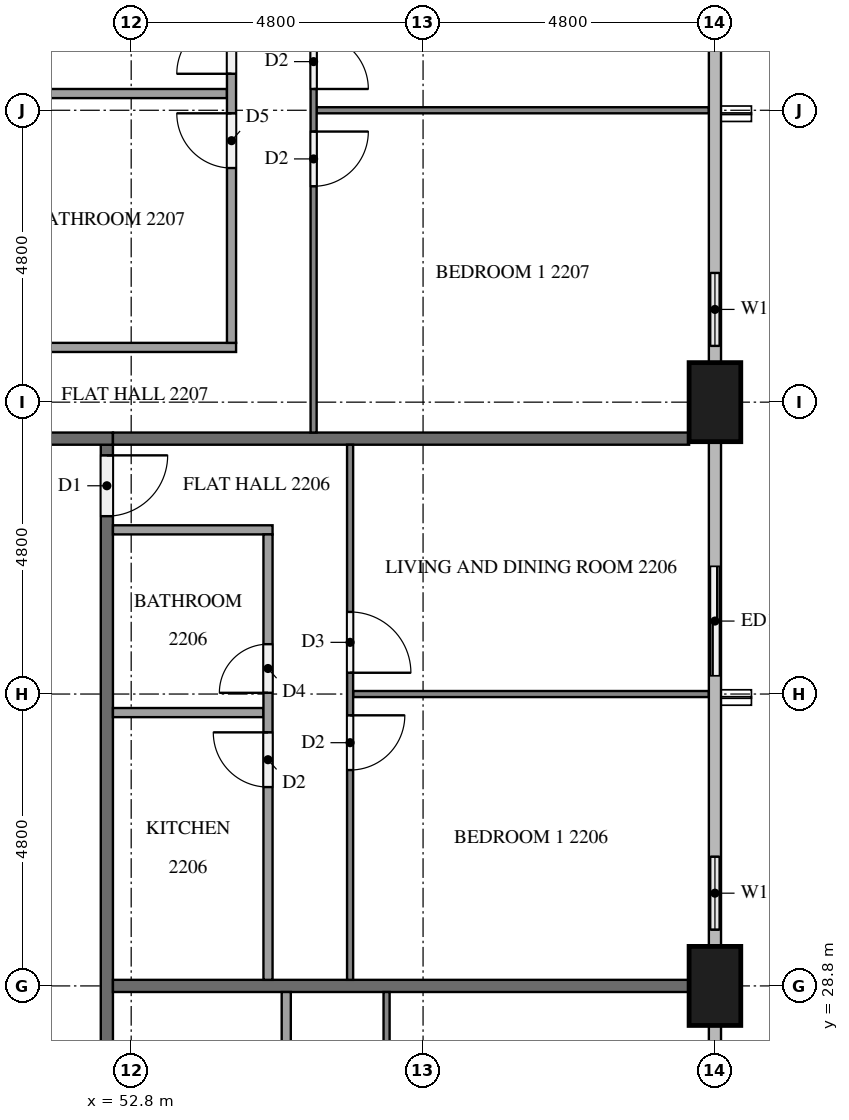
"""IFC4 building model, lengths in metres.
Left out: names, types, materials, properties, quantities, classifications, styles, units other than length and angle.
Written with IfcOpenShell. Run it as: python <this file> out.ifc"""

import sys

from ifc_helpers import new_model, si_unit, direction, frame, frame_2d, origin, origin_2d, place, context, subcontext, project, spatial, rectangle, extrude, element, fill, save


model = new_model("IFC4")
c1 = context("Model", 3, precision=1e-05, world=origin(), true_north=direction((0.0, 1.0)))
c2 = subcontext(c1, "Body", "Model", "MODEL_VIEW")
j1 = project(units=[si_unit("LENGTHUNIT", "METRE"), si_unit("PLANEANGLEUNIT", "RADIAN")], contexts=[c1])
p1 = place(None, origin())
s1 = spatial("IfcSite", under=j1, at=p1, CompositionType="ELEMENT")
p2 = place(p1, origin())
s2 = spatial("IfcBuilding", under=s1, at=p2, CompositionType="ELEMENT")
p3 = place(p2, frame((0.0, 0.0, 89.2)))
s3 = spatial("IfcBuildingStorey", under=s2, at=p3, CompositionType="ELEMENT", Elevation=89.2)
for number, where, z_axis, x_axis in (
    (1, (62.4, 28.8, 0.0), (0.0, 0.0, 1.0), (0.0, 1.0, 0.0)),
    (2, (62.4, 38.4, 0.0), (0.0, 0.0, 1.0), (0.0, 1.0, 0.0)),
):
    element("IfcColumn", number, at=place(p3, frame(where, z_axis=z_axis, x_axis=x_axis)), inside=s3, PredefinedType="COLUMN", context=c2, shape_type="SweptSolid", body=[
        extrude(rectangle(XDim=1.3, YDim=0.85, at=origin_2d()), origin(), (0.0, 0.0, 1.0), 3.2),
    ])
p4 = place(p3, frame((62.4, 29.45, 0.0), z_axis=(0.0, 0.0, 1.0), x_axis=(0.0, 1.0, 0.0)))
e3 = element("IfcWall", 3, at=p4, inside=s3, PredefinedType="SOLIDWALL", context=c2, shape_type="SweptSolid", body=[
    extrude(rectangle(XDim=1.75, YDim=0.15, at=frame_2d((0.875, 0.0))), origin(), (0.0, 0.0, 1.0), 3.2),
])
p5 = place(p4, frame((0.275, 0.0, 0.9)))
e4 = element("IfcOpeningElement", 4, at=p5, cuts=e3, PredefinedType="OPENING", context=c2, shape_type="SweptSolid", body=[
    extrude(rectangle(XDim=1.2, YDim=1.4, at=frame_2d((0.6, 0.7))), frame((0.0, 0.085, 0.0), z_axis=(0.0, -1.0, 0.0), x_axis=(1.0, 0.0, 0.0)), (0.0, 0.0, 1.0), 0.17),
])
p6 = place(p3, frame((62.4, 33.6, 0.0), z_axis=(0.0, 0.0, 1.0), x_axis=(0.0, 1.0, 0.0)))
e5 = element("IfcWall", 5, at=p6, inside=s3, PredefinedType="SOLIDWALL", context=c2, shape_type="SweptSolid", body=[
    extrude(rectangle(XDim=2.4, YDim=0.15, at=frame_2d((1.2, 0.0))), origin(), (0.0, 0.0, 1.0), 3.2),
])
p7 = place(p6, frame((0.3, 0.0, 0.0)))
e6 = element("IfcOpeningElement", 6, at=p7, cuts=e5, PredefinedType="OPENING", context=c2, shape_type="SweptSolid", body=[
    extrude(rectangle(XDim=1.8, YDim=2.4, at=frame_2d((0.9, 1.2))), frame((0.0, 0.085, 0.0), z_axis=(0.0, -1.0, 0.0), x_axis=(1.0, 0.0, 0.0)), (0.0, 0.0, 1.0), 0.17),
])
p8 = place(p3, frame((62.4, 39.05, 0.0), z_axis=(0.0, 0.0, 1.0), x_axis=(0.0, 1.0, 0.0)))
e7 = element("IfcWall", 7, at=p8, inside=s3, PredefinedType="SOLIDWALL", context=c2, shape_type="SweptSolid", body=[
    extrude(rectangle(XDim=1.75, YDim=0.15, at=frame_2d((0.875, 0.0))), origin(), (0.0, 0.0, 1.0), 3.2),
])
p9 = place(p8, frame((0.275, 0.0, 0.9)))
e8 = element("IfcOpeningElement", 8, at=p9, cuts=e7, PredefinedType="OPENING", context=c2, shape_type="SweptSolid", body=[
    extrude(rectangle(XDim=1.2, YDim=1.4, at=frame_2d((0.6, 0.7))), frame((0.0, 0.085, 0.0), z_axis=(0.0, -1.0, 0.0), x_axis=(1.0, 0.0, 0.0)), (0.0, 0.0, 1.0), 0.17),
])
p10 = place(p3, frame((52.4, 37.7, 0.0), z_axis=(0.0, 0.0, 1.0), x_axis=(0.0, -1.0, 0.0)))
e9 = element("IfcWall", 9, at=p10, inside=s3, PredefinedType="PARTITIONING", context=c2, shape_type="SweptSolid", body=[
    extrude(rectangle(XDim=22.6, YDim=0.2, at=frame_2d((11.3, 0.0))), origin(), (0.0, 0.0, 1.0), 3.2),
])
p11 = place(p10, frame((21.425, 0.0, 0.0)))
e10 = element("IfcOpeningElement", 10, at=p11, cuts=e9, PredefinedType="OPENING", context=c2, shape_type="SweptSolid", body=[
    extrude(rectangle(XDim=1.0, YDim=2.1, at=frame_2d((0.5, 1.05))), frame((0.0, 0.11, 0.0), z_axis=(0.0, -1.0, 0.0), x_axis=(1.0, 0.0, 0.0)), (0.0, 0.0, 1.0), 0.22),
])
p12 = place(p10, frame((0.175, 0.0, 0.0)))
e11 = element("IfcOpeningElement", 11, at=p12, cuts=e9, PredefinedType="OPENING", context=c2, shape_type="SweptSolid", body=[
    extrude(rectangle(XDim=1.0, YDim=2.1, at=frame_2d((0.5, 1.05))), frame((0.0, 0.11, 0.0), z_axis=(0.0, -1.0, 0.0), x_axis=(1.0, 0.0, 0.0)), (0.0, 0.0, 1.0), 0.22),
])
p13 = place(p3, frame((52.5, 37.8, 0.0), z_axis=(0.0, 0.0, 1.0), x_axis=(-1.0, 0.0, 0.0)))
e12 = element("IfcWall", 12, at=p13, inside=s3, PredefinedType="PARTITIONING", context=c2, shape_type="SweptSolid", body=[
    extrude(rectangle(XDim=2.2, YDim=0.2, at=frame_2d((1.1, 0.0))), origin(), (0.0, 0.0, 1.0), 3.2),
])
for number, where, z_axis, x_axis in (
    (13, (52.5, 28.8, 0.0), (0.0, 0.0, 1.0), (1.0, 0.0, 0.0)),
    (14, (52.5, 37.8, 0.0), (0.0, 0.0, 1.0), (1.0, 0.0, 0.0)),
):
    element("IfcWall", number, at=place(p3, frame(where, z_axis=z_axis, x_axis=x_axis)), inside=s3, PredefinedType="PARTITIONING", context=c2, shape_type="SweptSolid", body=[
        extrude(rectangle(XDim=9.475, YDim=0.2, at=frame_2d((4.738, 0.0))), origin(), (0.0, 0.0, 1.0), 3.2),
    ])
p14 = place(p3, frame((57.0, 28.7, 0.0), z_axis=(0.0, 0.0, 1.0), x_axis=(0.0, -1.0, 0.0)))
e15 = element("IfcWall", 15, at=p14, inside=s3, PredefinedType="PARTITIONING", context=c2, shape_type="SweptSolid", body=[
    extrude(rectangle(XDim=13.6, YDim=0.1, at=frame_2d((6.8, 0.0))), origin(), (0.0, 0.0, 1.0), 3.2),
])
p15 = place(p14, frame((12.4, 0.0, 0.0)))
e16 = element("IfcOpeningElement", 16, at=p15, cuts=e15, PredefinedType="OPENING", context=c2, shape_type="SweptSolid", body=[
    extrude(rectangle(XDim=0.9, YDim=2.1, at=frame_2d((0.45, 1.05))), frame((0.0, 0.06, 0.0), z_axis=(0.0, -1.0, 0.0), x_axis=(1.0, 0.0, 0.0)), (0.0, 0.0, 1.0), 0.12),
])
p16 = place(p14, frame((5.05, 0.0, 0.0)))
e17 = element("IfcOpeningElement", 17, at=p16, cuts=e15, PredefinedType="OPENING", context=c2, shape_type="SweptSolid", body=[
    extrude(rectangle(XDim=0.9, YDim=2.1, at=frame_2d((0.45, 1.05))), frame((0.0, 0.06, 0.0), z_axis=(0.0, -1.0, 0.0), x_axis=(1.0, 0.0, 0.0)), (0.0, 0.0, 1.0), 0.12),
])
p17 = place(p14, frame((3.35, 0.0, 0.0)))
e18 = element("IfcOpeningElement", 18, at=p17, cuts=e15, PredefinedType="OPENING", context=c2, shape_type="SweptSolid", body=[
    extrude(rectangle(XDim=1.0, YDim=2.1, at=frame_2d((0.5, 1.05))), frame((0.0, 0.06, 0.0), z_axis=(0.0, -1.0, 0.0), x_axis=(1.0, 0.0, 0.0)), (0.0, 0.0, 1.0), 0.12),
])
p18 = place(p3, frame((55.35, 16.575, 0.0), z_axis=(0.0, 0.0, 1.0), x_axis=(0.0, 1.0, 0.0)))
e19 = element("IfcWall", 19, at=p18, inside=s3, PredefinedType="PARTITIONING", context=c2, shape_type="SweptSolid", body=[
    extrude(rectangle(XDim=12.125, YDim=0.15, at=frame_2d((6.062, 0.0))), origin(), (0.0, 0.0, 1.0), 3.2),
])
p19 = place(p18, frame((0.3, 0.0, 0.0)))
e20 = element("IfcOpeningElement", 20, at=p19, cuts=e19, PredefinedType="OPENING", context=c2, shape_type="SweptSolid", body=[
    extrude(rectangle(XDim=0.8, YDim=2.1, at=frame_2d((0.4, 1.05))), frame((0.0, 0.085, 0.0), z_axis=(0.0, -1.0, 0.0), x_axis=(1.0, 0.0, 0.0)), (0.0, 0.0, 1.0), 0.17),
])
p20 = place(p18, frame((5.404, 0.0, 0.0)))
e21 = element("IfcOpeningElement", 21, at=p20, cuts=e19, PredefinedType="OPENING", context=c2, shape_type="SweptSolid", body=[
    extrude(rectangle(XDim=0.8, YDim=2.1, at=frame_2d((0.4, 1.05))), frame((0.0, 0.085, 0.0), z_axis=(0.0, -1.0, 0.0), x_axis=(1.0, 0.0, 0.0)), (0.0, 0.0, 1.0), 0.17),
])
p21 = place(p18, frame((6.854, 0.0, 0.0)))
e22 = element("IfcOpeningElement", 22, at=p21, cuts=e19, PredefinedType="OPENING", context=c2, shape_type="SweptSolid", body=[
    extrude(rectangle(XDim=0.9, YDim=2.1, at=frame_2d((0.45, 1.05))), frame((0.0, 0.085, 0.0), z_axis=(0.0, -1.0, 0.0), x_axis=(1.0, 0.0, 0.0)), (0.0, 0.0, 1.0), 0.17),
])
p22 = place(p3, frame((56.45, 33.6, 0.0), z_axis=(0.0, 0.0, 1.0), x_axis=(1.0, 0.0, 0.0)))
e23 = element("IfcWall", 23, at=p22, inside=s3, PredefinedType="PARTITIONING", context=c2, shape_type="SweptSolid", body=[
    extrude(rectangle(XDim=5.85, YDim=0.1, at=frame_2d((2.925, 0.0))), origin(), (0.0, 0.0, 1.0), 3.2),
])
p23 = place(p3, frame((56.4, 37.7, 0.0), z_axis=(0.0, 0.0, 1.0), x_axis=(0.0, -1.0, 0.0)))
e24 = element("IfcWall", 24, at=p23, inside=s3, PredefinedType="PARTITIONING", context=c2, shape_type="SweptSolid", body=[
    extrude(rectangle(XDim=8.8, YDim=0.1, at=frame_2d((4.4, 0.0))), origin(), (0.0, 0.0, 1.0), 3.2),
])
p24 = place(p23, frame((2.75, 0.0, 0.0)))
e25 = element("IfcOpeningElement", 25, at=p24, cuts=e24, PredefinedType="OPENING", context=c2, shape_type="SweptSolid", body=[
    extrude(rectangle(XDim=1.0, YDim=2.1, at=frame_2d((0.5, 1.05))), frame((0.0, 0.06, 0.0), z_axis=(0.0, -1.0, 0.0), x_axis=(1.0, 0.0, 0.0)), (0.0, 0.0, 1.0), 0.12),
])
p25 = place(p23, frame((4.45, 0.0, 0.0)))
e26 = element("IfcOpeningElement", 26, at=p25, cuts=e24, PredefinedType="OPENING", context=c2, shape_type="SweptSolid", body=[
    extrude(rectangle(XDim=0.9, YDim=2.1, at=frame_2d((0.45, 1.05))), frame((0.0, 0.06, 0.0), z_axis=(0.0, -1.0, 0.0), x_axis=(1.0, 0.0, 0.0)), (0.0, 0.0, 1.0), 0.12),
])
p26 = place(p3, frame((52.5, 33.295, 0.0), z_axis=(0.0, 0.0, 1.0), x_axis=(1.0, 0.0, 0.0)))
e27 = element("IfcWall", 27, at=p26, inside=s3, PredefinedType="PARTITIONING", context=c2, shape_type="SweptSolid", body=[
    extrude(rectangle(XDim=2.475, YDim=0.15, at=frame_2d((1.238, 0.0))), origin(), (0.0, 0.0, 1.0), 3.2),
])
p27 = place(p3, frame((52.5, 36.3, 0.0), z_axis=(0.0, 0.0, 1.0), x_axis=(1.0, 0.0, 0.0)))
e28 = element("IfcWall", 28, at=p27, inside=s3, PredefinedType="PARTITIONING", context=c2, shape_type="SweptSolid", body=[
    extrude(rectangle(XDim=2.625, YDim=0.15, at=frame_2d((1.312, 0.0))), origin(), (0.0, 0.0, 1.0), 3.2),
])
p28 = place(p3, frame((55.05, 28.9, 0.0), z_axis=(0.0, 0.0, 1.0), x_axis=(0.0, 1.0, 0.0)))
e29 = element("IfcWall", 29, at=p28, inside=s3, PredefinedType="PARTITIONING", context=c2, shape_type="SweptSolid", body=[
    extrude(rectangle(XDim=7.325, YDim=0.15, at=frame_2d((3.663, 0.0))), origin(), (0.0, 0.0, 1.0), 3.2),
])
p29 = place(p28, frame((4.72, 0.0, 0.0)))
e30 = element("IfcOpeningElement", 30, at=p29, cuts=e29, PredefinedType="OPENING", context=c2, shape_type="SweptSolid", body=[
    extrude(rectangle(XDim=0.8, YDim=2.1, at=frame_2d((0.4, 1.05))), frame((0.0, 0.085, 0.0), z_axis=(0.0, -1.0, 0.0), x_axis=(1.0, 0.0, 0.0)), (0.0, 0.0, 1.0), 0.17),
])
p30 = place(p28, frame((3.17, 0.0, 0.0)))
e31 = element("IfcOpeningElement", 31, at=p30, cuts=e29, PredefinedType="OPENING", context=c2, shape_type="SweptSolid", body=[
    extrude(rectangle(XDim=0.9, YDim=2.1, at=frame_2d((0.45, 1.05))), frame((0.0, 0.085, 0.0), z_axis=(0.0, -1.0, 0.0), x_axis=(1.0, 0.0, 0.0)), (0.0, 0.0, 1.0), 0.17),
])
p31 = place(p3, frame((55.85, 43.2, 0.0), z_axis=(0.0, 0.0, 1.0), x_axis=(1.0, 0.0, 0.0)))
e32 = element("IfcWall", 32, at=p31, inside=s3, PredefinedType="PARTITIONING", context=c2, shape_type="SweptSolid", body=[
    extrude(rectangle(XDim=6.45, YDim=0.1, at=frame_2d((3.225, 0.0))), origin(), (0.0, 0.0, 1.0), 3.2),
])
p32 = place(p3, frame((55.8, 52.7, 0.0), z_axis=(0.0, 0.0, 1.0), x_axis=(0.0, -1.0, 0.0)))
e33 = element("IfcWall", 33, at=p32, inside=s3, PredefinedType="PARTITIONING", context=c2, shape_type="SweptSolid", body=[
    extrude(rectangle(XDim=14.8, YDim=0.1, at=frame_2d((7.4, 0.0))), origin(), (0.0, 0.0, 1.0), 3.2),
])
p33 = place(p32, frame((9.85, 0.0, 0.0)))
e34 = element("IfcOpeningElement", 34, at=p33, cuts=e33, PredefinedType="OPENING", context=c2, shape_type="SweptSolid", body=[
    extrude(rectangle(XDim=0.9, YDim=2.1, at=frame_2d((0.45, 1.05))), frame((0.0, 0.06, 0.0), z_axis=(0.0, -1.0, 0.0), x_axis=(1.0, 0.0, 0.0)), (0.0, 0.0, 1.0), 0.12),
])
p34 = place(p32, frame((8.25, 0.0, 0.0)))
e35 = element("IfcOpeningElement", 35, at=p34, cuts=e33, PredefinedType="OPENING", context=c2, shape_type="SweptSolid", body=[
    extrude(rectangle(XDim=0.9, YDim=2.1, at=frame_2d((0.45, 1.05))), frame((0.0, 0.06, 0.0), z_axis=(0.0, -1.0, 0.0), x_axis=(1.0, 0.0, 0.0)), (0.0, 0.0, 1.0), 0.12),
])
p35 = place(p32, frame((0.5, 0.0, 0.0)))
e36 = element("IfcOpeningElement", 36, at=p35, cuts=e33, PredefinedType="OPENING", context=c2, shape_type="SweptSolid", body=[
    extrude(rectangle(XDim=1.0, YDim=2.1, at=frame_2d((0.5, 1.05))), frame((0.0, 0.06, 0.0), z_axis=(0.0, -1.0, 0.0), x_axis=(1.0, 0.0, 0.0)), (0.0, 0.0, 1.0), 0.12),
])
p36 = place(p3, frame((50.5, 43.475, 0.0), z_axis=(0.0, 0.0, 1.0), x_axis=(1.0, 0.0, 0.0)))
e37 = element("IfcWall", 37, at=p36, inside=s3, PredefinedType="PARTITIONING", context=c2, shape_type="SweptSolid", body=[
    extrude(rectangle(XDim=3.875, YDim=0.15, at=frame_2d((1.938, 0.0))), origin(), (0.0, 0.0, 1.0), 3.2),
])
p37 = place(p3, frame((50.5, 39.3, 0.0), z_axis=(0.0, 0.0, 1.0), x_axis=(1.0, 0.0, 0.0)))
e38 = element("IfcWall", 38, at=p37, inside=s3, PredefinedType="PARTITIONING", context=c2, shape_type="SweptSolid", body=[
    extrude(rectangle(XDim=4.025, YDim=0.15, at=frame_2d((2.012, 0.0))), origin(), (0.0, 0.0, 1.0), 3.2),
])
p38 = place(p3, frame((54.45, 39.375, 0.0), z_axis=(0.0, 0.0, 1.0), x_axis=(0.0, 1.0, 0.0)))
e39 = element("IfcWall", 39, at=p38, inside=s3, PredefinedType="PARTITIONING", context=c2, shape_type="SweptSolid", body=[
    extrude(rectangle(XDim=13.325, YDim=0.15, at=frame_2d((6.663, 0.0))), origin(), (0.0, 0.0, 1.0), 3.2),
])
p39 = place(p38, frame((2.875, 0.0, 0.0)))
e40 = element("IfcOpeningElement", 40, at=p39, cuts=e39, PredefinedType="OPENING", context=c2, shape_type="SweptSolid", body=[
    extrude(rectangle(XDim=0.9, YDim=2.1, at=frame_2d((0.45, 1.05))), frame((0.0, 0.085, 0.0), z_axis=(0.0, -1.0, 0.0), x_axis=(1.0, 0.0, 0.0)), (0.0, 0.0, 1.0), 0.17),
])
p40 = place(p38, frame((4.425, 0.0, 0.0)))
e41 = element("IfcOpeningElement", 41, at=p40, cuts=e39, PredefinedType="OPENING", context=c2, shape_type="SweptSolid", body=[
    extrude(rectangle(XDim=0.9, YDim=2.1, at=frame_2d((0.45, 1.05))), frame((0.0, 0.085, 0.0), z_axis=(0.0, -1.0, 0.0), x_axis=(1.0, 0.0, 0.0)), (0.0, 0.0, 1.0), 0.17),
])
p41 = place(p38, frame((12.175, 0.0, 0.0)))
e42 = element("IfcOpeningElement", 42, at=p41, cuts=e39, PredefinedType="OPENING", context=c2, shape_type="SweptSolid", body=[
    extrude(rectangle(XDim=0.8, YDim=2.1, at=frame_2d((0.4, 1.05))), frame((0.0, 0.085, 0.0), z_axis=(0.0, -1.0, 0.0), x_axis=(1.0, 0.0, 0.0)), (0.0, 0.0, 1.0), 0.17),
])
p42 = place(p5, origin())
e43 = element("IfcWindow", 43, at=p42, inside=s3, PartitioningType="SINGLE_PANEL", PredefinedType="WINDOW", context=c2, shape_type="SweptSolid", body=[
    extrude(rectangle(XDim=1.2, YDim=1.4, at=frame_2d((0.6, 0.7))), frame((0.0, 0.03, 0.0), z_axis=(0.0, -1.0, 0.0), x_axis=(1.0, 0.0, 0.0)), (0.0, 0.0, 1.0), 0.06),
])
fill(e4, e43)
p43 = place(p7, origin())
e44 = element("IfcDoor", 44, at=p43, inside=s3, OperationType="SLIDING_TO_LEFT", PredefinedType="DOOR", context=c2, shape_type="SweptSolid", body=[
    extrude(rectangle(XDim=1.8, YDim=2.4, at=frame_2d((0.9, 1.2))), frame((0.0, 0.025, 0.0), z_axis=(0.0, -1.0, 0.0), x_axis=(1.0, 0.0, 0.0)), (0.0, 0.0, 1.0), 0.05),
])
fill(e6, e44)
p44 = place(p9, origin())
e45 = element("IfcWindow", 45, at=p44, inside=s3, PartitioningType="SINGLE_PANEL", PredefinedType="WINDOW", context=c2, shape_type="SweptSolid", body=[
    extrude(rectangle(XDim=1.2, YDim=1.4, at=frame_2d((0.6, 0.7))), frame((0.0, 0.03, 0.0), z_axis=(0.0, -1.0, 0.0), x_axis=(1.0, 0.0, 0.0)), (0.0, 0.0, 1.0), 0.06),
])
fill(e8, e45)
p45 = place(p12, origin())
e46 = element("IfcDoor", 46, at=p45, inside=s3, OperationType="SINGLE_SWING_LEFT", PredefinedType="DOOR", context=c2, shape_type="SweptSolid", body=[
    extrude(rectangle(XDim=1.0, YDim=2.1, at=frame_2d((0.5, 1.05))), frame((0.0, 0.025, 0.0), z_axis=(0.0, -1.0, 0.0), x_axis=(1.0, 0.0, 0.0)), (0.0, 0.0, 1.0), 0.05),
])
fill(e11, e46)
p46 = place(p24, origin())
e47 = element("IfcDoor", 47, at=p46, inside=s3, OperationType="SINGLE_SWING_RIGHT", PredefinedType="DOOR", context=c2, shape_type="SweptSolid", body=[
    extrude(rectangle(XDim=1.0, YDim=2.1, at=frame_2d((0.5, 1.05))), frame((0.0, 0.025, 0.0), z_axis=(0.0, -1.0, 0.0), x_axis=(1.0, 0.0, 0.0)), (0.0, 0.0, 1.0), 0.05),
])
fill(e25, e47)
p47 = place(p25, origin())
e48 = element("IfcDoor", 48, at=p47, inside=s3, OperationType="SINGLE_SWING_LEFT", PredefinedType="DOOR", context=c2, shape_type="SweptSolid", body=[
    extrude(rectangle(XDim=0.9, YDim=2.1, at=frame_2d((0.45, 1.05))), frame((0.0, 0.025, 0.0), z_axis=(0.0, -1.0, 0.0), x_axis=(1.0, 0.0, 0.0)), (0.0, 0.0, 1.0), 0.05),
])
fill(e26, e48)
p48 = place(p29, origin())
e49 = element("IfcDoor", 49, at=p48, inside=s3, OperationType="SINGLE_SWING_LEFT", PredefinedType="DOOR", context=c2, shape_type="SweptSolid", body=[
    extrude(rectangle(XDim=0.8, YDim=2.1, at=frame_2d((0.4, 1.05))), frame((0.0, 0.025, 0.0), z_axis=(0.0, -1.0, 0.0), x_axis=(1.0, 0.0, 0.0)), (0.0, 0.0, 1.0), 0.05),
])
fill(e30, e49)
p49 = place(p30, origin())
e50 = element("IfcDoor", 50, at=p49, inside=s3, OperationType="SINGLE_SWING_RIGHT", PredefinedType="DOOR", context=c2, shape_type="SweptSolid", body=[
    extrude(rectangle(XDim=0.9, YDim=2.1, at=frame_2d((0.45, 1.05))), frame((0.0, 0.025, 0.0), z_axis=(0.0, -1.0, 0.0), x_axis=(1.0, 0.0, 0.0)), (0.0, 0.0, 1.0), 0.05),
])
fill(e31, e50)
p50 = place(p33, origin())
e51 = element("IfcDoor", 51, at=p50, inside=s3, OperationType="SINGLE_SWING_LEFT", PredefinedType="DOOR", context=c2, shape_type="SweptSolid", body=[
    extrude(rectangle(XDim=0.9, YDim=2.1, at=frame_2d((0.45, 1.05))), frame((0.0, 0.025, 0.0), z_axis=(0.0, -1.0, 0.0), x_axis=(1.0, 0.0, 0.0)), (0.0, 0.0, 1.0), 0.05),
])
fill(e34, e51)
p51 = place(p34, origin())
e52 = element("IfcDoor", 52, at=p51, inside=s3, OperationType="SINGLE_SWING_RIGHT", PredefinedType="DOOR", context=c2, shape_type="SweptSolid", body=[
    extrude(rectangle(XDim=0.9, YDim=2.1, at=frame_2d((0.45, 1.05))), frame((0.0, 0.025, 0.0), z_axis=(0.0, -1.0, 0.0), x_axis=(1.0, 0.0, 0.0)), (0.0, 0.0, 1.0), 0.05),
])
fill(e35, e52)
p52 = place(p39, origin())
e53 = element("IfcDoor", 53, at=p52, inside=s3, OperationType="SINGLE_SWING_RIGHT", PredefinedType="DOOR", context=c2, shape_type="SweptSolid", body=[
    extrude(rectangle(XDim=0.9, YDim=2.1, at=frame_2d((0.45, 1.05))), frame((0.0, 0.025, 0.0), z_axis=(0.0, -1.0, 0.0), x_axis=(1.0, 0.0, 0.0)), (0.0, 0.0, 1.0), 0.05),
])
fill(e40, e53)
p53 = place(p40, origin())
e54 = element("IfcDoor", 54, at=p53, inside=s3, OperationType="SINGLE_SWING_LEFT", PredefinedType="DOOR", context=c2, shape_type="SweptSolid", body=[
    extrude(rectangle(XDim=0.9, YDim=2.1, at=frame_2d((0.45, 1.05))), frame((0.0, 0.025, 0.0), z_axis=(0.0, -1.0, 0.0), x_axis=(1.0, 0.0, 0.0)), (0.0, 0.0, 1.0), 0.05),
])
fill(e41, e54)
save(model, sys.argv[1])
